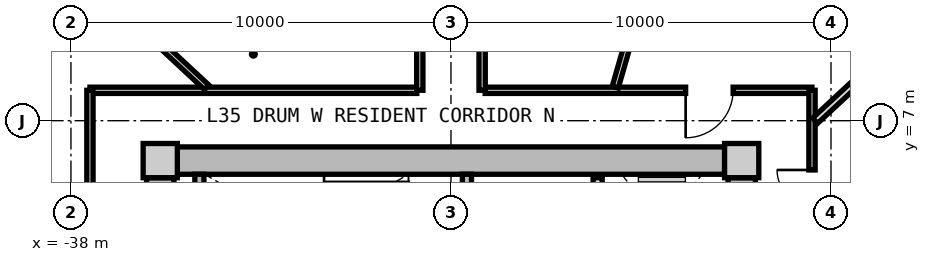
"""IFC4 building model, lengths in metres.
Left out: names, types, materials, properties, quantities, classifications, styles, units other than length and angle.
Written with IfcOpenShell. Run it as: python <this file> out.ifc"""

import sys

from ifc_helpers import new_model, si_unit, direction, frame, frame_2d, origin, origin_2d, place, context, subcontext, project, spatial, rectangle, extrude, source, transform, mapped, element, fill, save


model = new_model("IFC4")
c1 = context("Model", 3, precision=1e-05, world=origin(), true_north=direction((0.0, 1.0)))
c2 = subcontext(c1, "Body", "Model", "MODEL_VIEW")
j1 = project(units=[si_unit("LENGTHUNIT", "METRE"), si_unit("PLANEANGLEUNIT", "RADIAN")], contexts=[c1])
p1 = place(None, origin())
s1 = spatial("IfcSite", under=j1, at=p1, CompositionType="ELEMENT")
p2 = place(p1, origin())
s2 = spatial("IfcBuilding", under=s1, at=p2, CompositionType="ELEMENT")
p3 = place(p2, frame((0.0, 0.0, 114.55)))
s3 = spatial("IfcBuildingStorey", under=s2, at=p3, CompositionType="ELEMENT", Elevation=114.55)
m1 = source(origin(), c2, "Body", "SweptSolid", [
    extrude(rectangle(XDim=0.9, YDim=0.9, at=origin_2d()), origin(), (0.0, 0.0, 1.0), 3.05),
])
for number, where, z_axis, x_axis in (
    (1, (-20.35, 5.95, 0.0), (0.0, 0.0, 1.0), (1.0, 0.0, 0.0)),
    (2, (-35.65, 5.95, 0.0), (0.0, 0.0, 1.0), (1.0, 0.0, 0.0)),
):
    element("IfcColumn", number, at=place(p3, frame(where, z_axis=z_axis, x_axis=x_axis)), inside=s3, PredefinedType="COLUMN", context=c2, shape_type="MappedRepresentation", body=[
        mapped(m1, transform((0.0, 0.0, 0.0), x_axis=(1.0, 0.0, 0.0), y_axis=(0.0, 1.0, 0.0), z_axis=(0.0, 0.0, 1.0), scale=1.0)),
    ])
m2 = source(origin(), c2, "Body", "SweptSolid", [
    extrude(rectangle(XDim=14.4, YDim=0.72, at=frame_2d((7.2, 0.0))), origin(), (0.0, 0.0, 1.0), 2.79),
])
p4 = place(p3, frame((-35.2, 5.95, 0.0), z_axis=(0.0, 0.0, 1.0), x_axis=(1.0, 0.0, 0.0)))
e3 = element("IfcWall", 3, at=p4, inside=s3, PredefinedType="SHEAR", context=c2, shape_type="MappedRepresentation", body=[
    mapped(m2, transform((0.0, 0.0, 0.0), x_axis=(1.0, 0.0, 0.0), y_axis=(0.0, 1.0, 0.0), z_axis=(0.0, 0.0, 1.0), scale=1.0)),
])
m3 = source(origin(), c2, "Body", "SweptSolid", [
    extrude(rectangle(XDim=11.0, YDim=0.72, at=frame_2d((5.5, 0.0))), origin(), (0.0, 0.0, 1.0), 2.79),
])
p5 = place(p3, frame((-35.65, -5.5, 0.0), z_axis=(0.0, 0.0, 1.0), x_axis=(0.0, 1.0, 0.0)))
e4 = element("IfcWall", 4, at=p5, inside=s3, PredefinedType="SHEAR", context=c2, shape_type="MappedRepresentation", body=[
    mapped(m3, transform((0.0, 0.0, 0.0), x_axis=(1.0, 0.0, 0.0), y_axis=(0.0, 1.0, 0.0), z_axis=(0.0, 0.0, 1.0), scale=1.0)),
])
p6 = place(p5, frame((3.8, 0.0, 0.0)))
e5 = element("IfcOpeningElement", 5, at=p6, cuts=e4, PredefinedType="OPENING", context=c2, shape_type="SweptSolid", body=[
    extrude(rectangle(XDim=1.2, YDim=2.15, at=frame_2d((0.6, 1.075))), frame((0.0, 0.37, 0.0), z_axis=(0.0, -1.0, 0.0), x_axis=(1.0, 0.0, 0.0)), (0.0, 0.0, 1.0), 0.74),
])
p7 = place(p3, frame((-20.35, 5.5, 0.0), z_axis=(0.0, 0.0, 1.0), x_axis=(0.0, -1.0, 0.0)))
e6 = element("IfcWall", 6, at=p7, inside=s3, PredefinedType="SHEAR", context=c2, shape_type="MappedRepresentation", body=[
    mapped(m3, transform((0.0, 0.0, 0.0), x_axis=(1.0, 0.0, 0.0), y_axis=(0.0, 1.0, 0.0), z_axis=(0.0, 0.0, 1.0), scale=1.0)),
])
p8 = place(p7, frame((5.65, 0.0, 0.0)))
e7 = element("IfcOpeningElement", 7, at=p8, cuts=e6, PredefinedType="OPENING", context=c2, shape_type="SweptSolid", body=[
    extrude(rectangle(XDim=1.2, YDim=2.15, at=frame_2d((0.6, 1.075))), frame((0.0, 0.37, 0.0), z_axis=(0.0, -1.0, 0.0), x_axis=(1.0, 0.0, 0.0)), (0.0, 0.0, 1.0), 0.74),
])
p9 = place(p7, frame((9.3, 0.0, 0.0)))
e8 = element("IfcOpeningElement", 8, at=p9, cuts=e6, PredefinedType="OPENING", context=c2, shape_type="SweptSolid", body=[
    extrude(rectangle(XDim=1.0, YDim=2.1, at=frame_2d((0.5, 1.05))), frame((0.0, 0.37, 0.0), z_axis=(0.0, -1.0, 0.0), x_axis=(1.0, 0.0, 0.0)), (0.0, 0.0, 1.0), 0.74),
])
m4 = source(origin(), c2, "Body", "SweptSolid", [
    extrude(rectangle(XDim=3.14, YDim=0.24, at=frame_2d((1.57, 0.0))), origin(), (0.0, 0.0, 1.0), 2.79),
])
p10 = place(p3, frame((-34.62, 2.45, 0.0), z_axis=(0.0, 0.0, 1.0), x_axis=(0.0, 1.0, 0.0)))
e9 = element("IfcWall", 9, at=p10, inside=s3, PredefinedType="PARTITIONING", context=c2, shape_type="MappedRepresentation", body=[
    mapped(m4, transform((0.0, 0.0, 0.0), x_axis=(1.0, 0.0, 0.0), y_axis=(0.0, 1.0, 0.0), z_axis=(0.0, 0.0, 1.0), scale=1.0)),
])
p11 = place(p3, frame((-27.58, 2.45, 0.0), z_axis=(0.0, 0.0, 1.0), x_axis=(0.0, 1.0, 0.0)))
e10 = element("IfcWall", 10, at=p11, inside=s3, PredefinedType="PARTITIONING", context=c2, shape_type="MappedRepresentation", body=[
    mapped(m4, transform((0.0, 0.0, 0.0), x_axis=(1.0, 0.0, 0.0), y_axis=(0.0, 1.0, 0.0), z_axis=(0.0, 0.0, 1.0), scale=1.0)),
])
p12 = place(p11, frame((0.55, 0.0, 0.0)))
e11 = element("IfcOpeningElement", 11, at=p12, cuts=e10, PredefinedType="OPENING", context=c2, shape_type="SweptSolid", body=[
    extrude(rectangle(XDim=1.1, YDim=2.15, at=frame_2d((0.55, 1.075))), frame((0.0, 0.13, 0.0), z_axis=(0.0, -1.0, 0.0), x_axis=(1.0, 0.0, 0.0)), (0.0, 0.0, 1.0), 0.26),
])
m5 = source(origin(), c2, "Body", "SweptSolid", [
    extrude(rectangle(XDim=5.0, YDim=0.24, at=frame_2d((2.5, 0.0))), origin(), (0.0, 0.0, 1.0), 2.775),
])
p13 = place(p3, frame((-24.14, 0.5, 0.0), z_axis=(0.0, 0.0, 1.0), x_axis=(0.0, 1.0, 0.0)))
e12 = element("IfcWall", 12, at=p13, inside=s3, PredefinedType="PARTITIONING", context=c2, shape_type="MappedRepresentation", body=[
    mapped(m5, transform((0.0, 0.0, 0.0), x_axis=(1.0, 0.0, 0.0), y_axis=(0.0, 1.0, 0.0), z_axis=(0.0, 0.0, 1.0), scale=1.0)),
])
p14 = place(p13, frame((3.05, 0.0, 0.0)))
e13 = element("IfcOpeningElement", 13, at=p14, cuts=e12, PredefinedType="OPENING", context=c2, shape_type="SweptSolid", body=[
    extrude(rectangle(XDim=1.3, YDim=2.2, at=frame_2d((0.65, 1.1))), frame((0.0, 0.13, 0.0), z_axis=(0.0, -1.0, 0.0), x_axis=(1.0, 0.0, 0.0)), (0.0, 0.0, 1.0), 0.26),
])
p15 = place(p13, frame((0.55, 0.0, 0.0)))
e14 = element("IfcOpeningElement", 14, at=p15, cuts=e12, PredefinedType="OPENING", context=c2, shape_type="SweptSolid", body=[
    extrude(rectangle(XDim=1.3, YDim=2.2, at=frame_2d((0.65, 1.1))), frame((0.0, 0.13, 0.0), z_axis=(0.0, -1.0, 0.0), x_axis=(1.0, 0.0, 0.0)), (0.0, 0.0, 1.0), 0.26),
])
m6 = source(origin(), c2, "Body", "SweptSolid", [
    extrude(rectangle(XDim=8.6, YDim=0.165, at=frame_2d((4.3, 0.0))), origin(), (0.0, 0.0, 1.0), 2.775),
])
p16 = place(p3, frame((-37.5, 7.8, 0.0), z_axis=(0.0, 0.0, 1.0), x_axis=(1.0, 0.0, 0.0)))
e15 = element("IfcWall", 15, at=p16, inside=s3, PredefinedType="PARTITIONING", context=c2, shape_type="MappedRepresentation", body=[
    mapped(m6, transform((0.0, 0.0, 0.0), x_axis=(1.0, 0.0, 0.0), y_axis=(0.0, 1.0, 0.0), z_axis=(0.0, 0.0, 1.0), scale=1.0)),
])
p17 = place(p3, frame((-27.1, 7.8, 0.0), z_axis=(0.0, 0.0, 1.0), x_axis=(1.0, 0.0, 0.0)))
e16 = element("IfcWall", 16, at=p17, inside=s3, PredefinedType="PARTITIONING", context=c2, shape_type="MappedRepresentation", body=[
    mapped(m6, transform((0.0, 0.0, 0.0), x_axis=(1.0, 0.0, 0.0), y_axis=(0.0, 1.0, 0.0), z_axis=(0.0, 0.0, 1.0), scale=1.0)),
])
p18 = place(p17, frame((5.275, 0.0, 0.0)))
e17 = element("IfcOpeningElement", 17, at=p18, cuts=e16, PredefinedType="OPENING", context=c2, shape_type="SweptSolid", body=[
    extrude(rectangle(XDim=1.25, YDim=2.2, at=frame_2d((0.625, 1.1))), frame((0.0, 0.093, 0.0), z_axis=(0.0, -1.0, 0.0), x_axis=(1.0, 0.0, 0.0)), (0.0, 0.0, 1.0), 0.185),
])
m7 = source(origin(), c2, "Body", "SweptSolid", [
    extrude(rectangle(XDim=15.6, YDim=0.165, at=frame_2d((7.8, 0.0))), origin(), (0.0, 0.0, 1.0), 2.775),
])
p19 = place(p3, frame((-37.5, -7.8, 0.0), z_axis=(0.0, 0.0, 1.0), x_axis=(0.0, 1.0, 0.0)))
e18 = element("IfcWall", 18, at=p19, inside=s3, PredefinedType="PARTITIONING", context=c2, shape_type="MappedRepresentation", body=[
    mapped(m7, transform((0.0, 0.0, 0.0), x_axis=(1.0, 0.0, 0.0), y_axis=(0.0, 1.0, 0.0), z_axis=(0.0, 0.0, 1.0), scale=1.0)),
])
p20 = place(p19, frame((7.175, 0.0, 0.0)))
e19 = element("IfcOpeningElement", 19, at=p20, cuts=e18, PredefinedType="OPENING", context=c2, shape_type="SweptSolid", body=[
    extrude(rectangle(XDim=1.25, YDim=2.2, at=frame_2d((0.625, 1.1))), frame((0.0, 0.093, 0.0), z_axis=(0.0, -1.0, 0.0), x_axis=(1.0, 0.0, 0.0)), (0.0, 0.0, 1.0), 0.185),
])
p21 = place(p3, frame((-18.5, 7.8, 0.0), z_axis=(0.0, 0.0, 1.0), x_axis=(0.0, -1.0, 0.0)))
e20 = element("IfcWall", 20, at=p21, inside=s3, PredefinedType="PARTITIONING", context=c2, shape_type="MappedRepresentation", body=[
    mapped(m7, transform((0.0, 0.0, 0.0), x_axis=(1.0, 0.0, 0.0), y_axis=(0.0, 1.0, 0.0), z_axis=(0.0, 0.0, 1.0), scale=1.0)),
])
p22 = place(p21, frame((12.002, 0.0, 0.0)))
e21 = element("IfcOpeningElement", 21, at=p22, cuts=e20, PredefinedType="OPENING", context=c2, shape_type="SweptSolid", body=[
    extrude(rectangle(XDim=1.05, YDim=2.15, at=frame_2d((0.525, 1.075))), frame((0.0, 0.093, 0.0), z_axis=(0.0, -1.0, 0.0), x_axis=(1.0, 0.0, 0.0)), (0.0, 0.0, 1.0), 0.185),
])
p23 = place(p21, frame((10.211, 0.0, 0.0)))
e22 = element("IfcOpeningElement", 22, at=p23, cuts=e20, PredefinedType="OPENING", context=c2, shape_type="SweptSolid", body=[
    extrude(rectangle(XDim=1.05, YDim=2.15, at=frame_2d((0.525, 1.075))), frame((0.0, 0.093, 0.0), z_axis=(0.0, -1.0, 0.0), x_axis=(1.0, 0.0, 0.0)), (0.0, 0.0, 1.0), 0.185),
])
p24 = place(p21, frame((8.212, 0.0, 0.0)))
e23 = element("IfcOpeningElement", 23, at=p24, cuts=e20, PredefinedType="OPENING", context=c2, shape_type="SweptSolid", body=[
    extrude(rectangle(XDim=1.05, YDim=2.15, at=frame_2d((0.525, 1.075))), frame((0.0, 0.093, 0.0), z_axis=(0.0, -1.0, 0.0), x_axis=(1.0, 0.0, 0.0)), (0.0, 0.0, 1.0), 0.185),
])
p25 = place(p21, frame((6.291, 0.0, 0.0)))
e24 = element("IfcOpeningElement", 24, at=p25, cuts=e20, PredefinedType="OPENING", context=c2, shape_type="SweptSolid", body=[
    extrude(rectangle(XDim=1.05, YDim=2.15, at=frame_2d((0.525, 1.075))), frame((0.0, 0.093, 0.0), z_axis=(0.0, -1.0, 0.0), x_axis=(1.0, 0.0, 0.0)), (0.0, 0.0, 1.0), 0.185),
])
p26 = place(p21, frame((4.739, 0.0, 0.0)))
e25 = element("IfcOpeningElement", 25, at=p26, cuts=e20, PredefinedType="OPENING", context=c2, shape_type="SweptSolid", body=[
    extrude(rectangle(XDim=0.92, YDim=2.1, at=frame_2d((0.46, 1.05))), frame((0.0, 0.093, 0.0), z_axis=(0.0, -1.0, 0.0), x_axis=(1.0, 0.0, 0.0)), (0.0, 0.0, 1.0), 0.185),
])
p27 = place(p21, frame((2.096, 0.0, 0.0)))
e26 = element("IfcOpeningElement", 26, at=p27, cuts=e20, PredefinedType="OPENING", context=c2, shape_type="SweptSolid", body=[
    extrude(rectangle(XDim=0.92, YDim=2.1, at=frame_2d((0.46, 1.05))), frame((0.0, 0.093, 0.0), z_axis=(0.0, -1.0, 0.0), x_axis=(1.0, 0.0, 0.0)), (0.0, 0.0, 1.0), 0.185),
])
m8 = source(origin(), c2, "Body", "SweptSolid", [
    extrude(rectangle(XDim=8.989, YDim=0.165, at=frame_2d((4.495, 0.0))), origin(), (0.0, 0.0, 1.0), 2.275),
])
p28 = place(p3, frame((-23.678, 7.88, 0.0), z_axis=(0.0, 0.0, 1.0), x_axis=(0.27702323008, 0.960863221274, 0.0)))
e27 = element("IfcWall", 27, at=p28, inside=s3, PredefinedType="PARTITIONING", context=c2, shape_type="MappedRepresentation", body=[
    mapped(m8, transform((0.0, 0.0, 0.0), x_axis=(1.0, 0.0, 0.0), y_axis=(0.0, 1.0, 0.0), z_axis=(0.0, 0.0, 1.0), scale=1.0)),
])
m9 = source(origin(), c2, "Body", "SweptSolid", [
    extrude(rectangle(XDim=6.187, YDim=0.165, at=frame_2d((3.093, 0.0))), origin(), (0.0, 0.0, 1.0), 2.275),
])
p29 = place(p3, frame((-34.429, 7.88, 0.0), z_axis=(0.0, 0.0, 1.0), x_axis=(-0.732501077882, 0.680765870841, 0.0)))
e28 = element("IfcWall", 28, at=p29, inside=s3, PredefinedType="PARTITIONING", context=c2, shape_type="MappedRepresentation", body=[
    mapped(m9, transform((0.0, 0.0, 0.0), x_axis=(1.0, 0.0, 0.0), y_axis=(0.0, 1.0, 0.0), z_axis=(0.0, 0.0, 1.0), scale=1.0)),
])
m10 = source(origin(), c2, "Body", "SweptSolid", [
    extrude(rectangle(XDim=7.56, YDim=0.165, at=frame_2d((3.78, 0.0))), origin(), (0.0, 0.0, 1.0), 2.775),
])
p30 = place(p3, frame((-28.82, 7.8, 0.0), z_axis=(0.0, 0.0, 1.0), x_axis=(0.0, 1.0, 0.0)))
e29 = element("IfcWall", 29, at=p30, inside=s3, PredefinedType="PARTITIONING", context=c2, shape_type="MappedRepresentation", body=[
    mapped(m10, transform((0.0, 0.0, 0.0), x_axis=(1.0, 0.0, 0.0), y_axis=(0.0, 1.0, 0.0), z_axis=(0.0, 0.0, 1.0), scale=1.0)),
])
p31 = place(p30, frame((3.255, 0.0, 0.0)))
e30 = element("IfcOpeningElement", 30, at=p31, cuts=e29, PredefinedType="OPENING", context=c2, shape_type="SweptSolid", body=[
    extrude(rectangle(XDim=1.05, YDim=2.15, at=frame_2d((0.525, 1.075))), frame((0.0, 0.093, 0.0), z_axis=(0.0, -1.0, 0.0), x_axis=(1.0, 0.0, 0.0)), (0.0, 0.0, 1.0), 0.185),
])
p32 = place(p3, frame((-27.18, 7.8, 0.0), z_axis=(0.0, 0.0, 1.0), x_axis=(0.0, 1.0, 0.0)))
e31 = element("IfcWall", 31, at=p32, inside=s3, PredefinedType="PARTITIONING", context=c2, shape_type="MappedRepresentation", body=[
    mapped(m10, transform((0.0, 0.0, 0.0), x_axis=(1.0, 0.0, 0.0), y_axis=(0.0, 1.0, 0.0), z_axis=(0.0, 0.0, 1.0), scale=1.0)),
])
p33 = place(p32, frame((3.255, 0.0, 0.0)))
e32 = element("IfcOpeningElement", 32, at=p33, cuts=e31, PredefinedType="OPENING", context=c2, shape_type="SweptSolid", body=[
    extrude(rectangle(XDim=1.05, YDim=2.15, at=frame_2d((0.525, 1.075))), frame((0.0, 0.093, 0.0), z_axis=(0.0, -1.0, 0.0), x_axis=(1.0, 0.0, 0.0)), (0.0, 0.0, 1.0), 0.185),
])
m11 = source(origin(), c2, "Body", "SweptSolid", [
    extrude(rectangle(XDim=7.482, YDim=0.19, at=frame_2d((3.741, 0.0))), origin(), (0.0, 0.0, 1.0), 2.275),
])
p34 = place(p3, frame((-18.42, 6.998, 0.0), z_axis=(0.0, 0.0, 1.0), x_axis=(0.732508698043, 0.680757671489, 0.0)))
e33 = element("IfcWall", 33, at=p34, inside=s3, PredefinedType="PARTITIONING", context=c2, shape_type="MappedRepresentation", body=[
    mapped(m11, transform((0.0, 0.0, 0.0), x_axis=(1.0, 0.0, 0.0), y_axis=(0.0, 1.0, 0.0), z_axis=(0.0, 0.0, 1.0), scale=1.0)),
])
m12 = source(origin(), c2, "Body", "SweptSolid", [
    extrude(rectangle(XDim=9.447, YDim=0.14, at=frame_2d((4.724, 0.0))), origin(), (0.0, 0.0, 1.0), 2.775),
])
p35 = place(p3, frame((-18.47, 3.289, 0.0), z_axis=(0.0, 0.0, 1.0), x_axis=(0.918162367414, 0.396204324894, 0.0)))
e34 = element("IfcWall", 34, at=p35, inside=s3, PredefinedType="PARTITIONING", context=c2, shape_type="MappedRepresentation", body=[
    mapped(m12, transform((0.0, 0.0, 0.0), x_axis=(1.0, 0.0, 0.0), y_axis=(0.0, 1.0, 0.0), z_axis=(0.0, 0.0, 1.0), scale=1.0)),
])
m13 = source(origin(), c2, "Body", "SweptSolid", [
    extrude(rectangle(XDim=0.92, YDim=2.1, at=frame_2d((0.46, 1.05))), frame((0.0, 0.025, 0.0), z_axis=(0.0, -1.0, 0.0), x_axis=(1.0, 0.0, 0.0)), (0.0, 0.0, 1.0), 0.05),
])
p36 = place(p27, frame((0.92, 0.0, 0.0), z_axis=(0.0, 0.0, 1.0), x_axis=(-1.0, 0.0, 0.0)))
e35 = element("IfcDoor", 35, at=p36, inside=s3, OperationType="SINGLE_SWING_RIGHT", PredefinedType="DOOR", context=c2, shape_type="MappedRepresentation", body=[
    mapped(m13, transform((0.0, 0.0, 0.0), x_axis=(1.0, 0.0, 0.0), y_axis=(0.0, 1.0, 0.0), z_axis=(0.0, 0.0, 1.0), scale=1.0)),
])
fill(e26, e35)
m14 = source(origin(), c2, "Body", "SweptSolid", [
    extrude(rectangle(XDim=1.25, YDim=2.2, at=frame_2d((0.625, 1.1))), frame((0.0, 0.025, 0.0), z_axis=(0.0, -1.0, 0.0), x_axis=(1.0, 0.0, 0.0)), (0.0, 0.0, 1.0), 0.05),
])
p37 = place(p18, frame((1.25, 0.0, 0.0), z_axis=(0.0, 0.0, 1.0), x_axis=(-1.0, 0.0, 0.0)))
e36 = element("IfcDoor", 36, at=p37, inside=s3, OperationType="SINGLE_SWING_RIGHT", PredefinedType="DOOR", context=c2, shape_type="MappedRepresentation", body=[
    mapped(m14, transform((0.0, 0.0, 0.0), x_axis=(1.0, 0.0, 0.0), y_axis=(0.0, 1.0, 0.0), z_axis=(0.0, 0.0, 1.0), scale=1.0)),
])
fill(e17, e36)
save(model, sys.argv[1])
